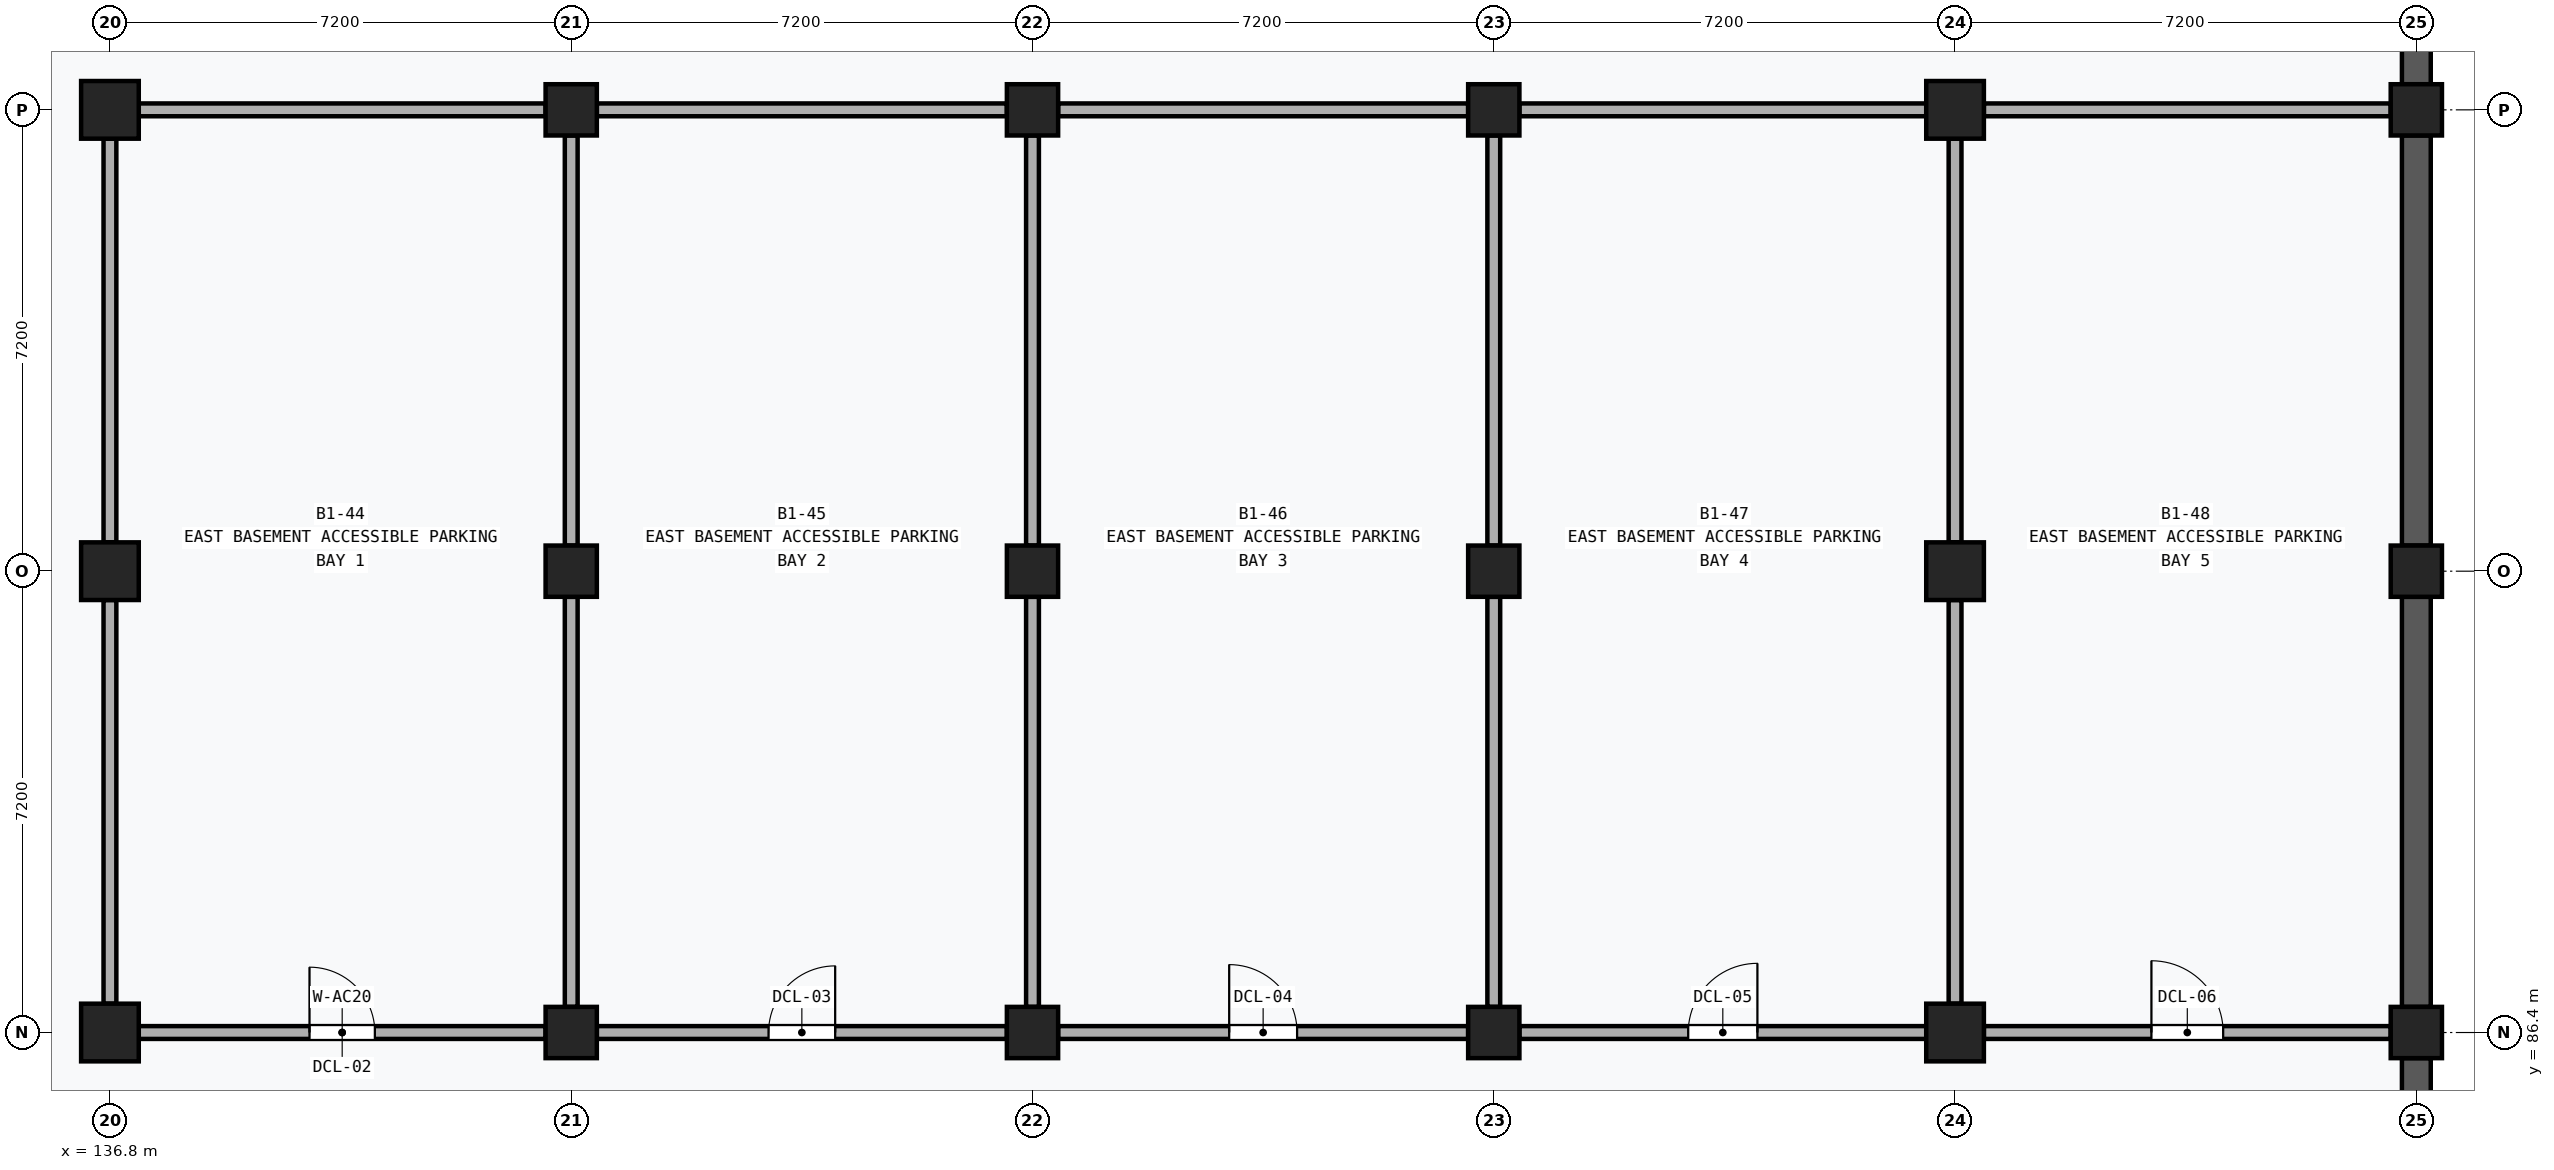
"""IFC4 building model, lengths in metres.
Left out: names, types, materials, properties, quantities, classifications, styles, units other than length and angle.
Written with IfcOpenShell. Run it as: python <this file> out.ifc"""

import sys

from ifc_helpers import new_model, si_unit, direction, frame, frame_2d, origin, origin_2d, place, context, subcontext, project, spatial, rectangle, extrude, element, fill, save


model = new_model("IFC4")
c1 = context("Model", 3, precision=1e-05, world=origin(), true_north=direction((0.0, 1.0)))
c2 = subcontext(c1, "Body", "Model", "MODEL_VIEW")
j1 = project(units=[si_unit("LENGTHUNIT", "METRE"), si_unit("PLANEANGLEUNIT", "RADIAN")], contexts=[c1])
p1 = place(None, origin())
s1 = spatial("IfcSite", under=j1, at=p1, CompositionType="ELEMENT")
p2 = place(p1, origin())
s2 = spatial("IfcBuilding", under=s1, at=p2, CompositionType="ELEMENT")
p3 = place(p2, frame((0.0, 0.0, -4.5)))
s3 = spatial("IfcBuildingStorey", under=s2, at=p3, CompositionType="ELEMENT", Elevation=-4.5)
for number, where, z_axis, x_axis in (
    (1, (136.8, 86.4, 0.0), (0.0, 0.0, 1.0), (1.0, 0.0, 0.0)),
    (2, (136.8, 93.6, 0.0), (0.0, 0.0, 1.0), (1.0, 0.0, 0.0)),
    (3, (136.8, 100.8, 0.0), (0.0, 0.0, 1.0), (1.0, 0.0, 0.0)),
):
    element("IfcColumn", number, at=place(p3, frame(where, z_axis=z_axis, x_axis=x_axis)), inside=s3, PredefinedType="COLUMN", context=c2, shape_type="SweptSolid", body=[
        extrude(rectangle(XDim=0.9, YDim=0.9, at=origin_2d()), origin(), (0.0, 0.0, 1.0), 4.5),
    ])
for number, where, z_axis, x_axis in (
    (4, (144.0, 86.4, 0.0), (0.0, 0.0, 1.0), (1.0, 0.0, 0.0)),
    (5, (144.0, 93.6, 0.0), (0.0, 0.0, 1.0), (1.0, 0.0, 0.0)),
    (6, (144.0, 100.8, 0.0), (0.0, 0.0, 1.0), (1.0, 0.0, 0.0)),
    (7, (151.2, 86.4, 0.0), (0.0, 0.0, 1.0), (1.0, 0.0, 0.0)),
    (8, (151.2, 93.6, 0.0), (0.0, 0.0, 1.0), (1.0, 0.0, 0.0)),
    (9, (151.2, 100.8, 0.0), (0.0, 0.0, 1.0), (1.0, 0.0, 0.0)),
    (10, (158.4, 86.4, 0.0), (0.0, 0.0, 1.0), (1.0, 0.0, 0.0)),
    (11, (158.4, 93.6, 0.0), (0.0, 0.0, 1.0), (1.0, 0.0, 0.0)),
    (12, (158.4, 100.8, 0.0), (0.0, 0.0, 1.0), (1.0, 0.0, 0.0)),
):
    element("IfcColumn", number, at=place(p3, frame(where, z_axis=z_axis, x_axis=x_axis)), inside=s3, PredefinedType="COLUMN", context=c2, shape_type="SweptSolid", body=[
        extrude(rectangle(XDim=0.8, YDim=0.8, at=origin_2d()), origin(), (0.0, 0.0, 1.0), 4.5),
    ])
for number, where, z_axis, x_axis in (
    (13, (165.6, 86.4, 0.0), (0.0, 0.0, 1.0), (1.0, 0.0, 0.0)),
    (14, (165.6, 93.6, 0.0), (0.0, 0.0, 1.0), (1.0, 0.0, 0.0)),
    (15, (165.6, 100.8, 0.0), (0.0, 0.0, 1.0), (1.0, 0.0, 0.0)),
):
    element("IfcColumn", number, at=place(p3, frame(where, z_axis=z_axis, x_axis=x_axis)), inside=s3, PredefinedType="COLUMN", context=c2, shape_type="SweptSolid", body=[
        extrude(rectangle(XDim=0.9, YDim=0.9, at=origin_2d()), origin(), (0.0, 0.0, 1.0), 4.5),
    ])
for number, where, z_axis, x_axis in (
    (16, (172.8, 86.4, 0.0), (0.0, 0.0, 1.0), (1.0, 0.0, 0.0)),
    (17, (172.8, 93.6, 0.0), (0.0, 0.0, 1.0), (1.0, 0.0, 0.0)),
    (18, (172.8, 100.8, 0.0), (0.0, 0.0, 1.0), (1.0, 0.0, 0.0)),
):
    element("IfcColumn", number, at=place(p3, frame(where, z_axis=z_axis, x_axis=x_axis)), inside=s3, PredefinedType="COLUMN", context=c2, shape_type="SweptSolid", body=[
        extrude(rectangle(XDim=0.8, YDim=0.8, at=origin_2d()), origin(), (0.0, 0.0, 1.0), 4.5),
    ])
for number, where, z_axis, x_axis in (
    (19, (172.8, 79.6, 0.0), (0.0, 0.0, 1.0), (0.0, 1.0, 0.0)),
    (20, (172.8, 86.8, 0.0), (0.0, 0.0, 1.0), (0.0, 1.0, 0.0)),
    (21, (172.8, 94.0, 0.0), (0.0, 0.0, 1.0), (0.0, 1.0, 0.0)),
):
    element("IfcWall", number, at=place(p3, frame(where, z_axis=z_axis, x_axis=x_axis)), inside=s3, PredefinedType="SOLIDWALL", context=c2, shape_type="SweptSolid", body=[
        extrude(rectangle(XDim=6.4, YDim=0.45, at=frame_2d((3.2, 0.0))), origin(), (0.0, 0.0, 1.0), 3.57),
    ])
p4 = place(p3, frame((172.8, 101.2, 0.0), z_axis=(0.0, 0.0, 1.0), x_axis=(0.0, 1.0, 0.0)))
e22 = element("IfcWall", 22, at=p4, inside=s3, PredefinedType="SOLIDWALL", context=c2, shape_type="SweptSolid", body=[
    extrude(rectangle(XDim=6.4, YDim=0.45, at=frame_2d((3.2, 0.0))), origin(), (0.0, 0.0, 1.0), 3.57),
])
p5 = place(p3, frame((137.25, 86.4, 0.0), z_axis=(0.0, 0.0, 1.0), x_axis=(1.0, 0.0, 0.0)))
e23 = element("IfcWall", 23, at=p5, inside=s3, PredefinedType="PARTITIONING", context=c2, shape_type="SweptSolid", body=[
    extrude(rectangle(XDim=6.35, YDim=0.2, at=frame_2d((3.175, 0.0))), origin(), (0.0, 0.0, 1.0), 3.3),
])
p6 = place(p5, frame((2.665, 0.0, 0.0)))
e24 = element("IfcOpeningElement", 24, at=p6, cuts=e23, PredefinedType="OPENING", context=c2, shape_type="SweptSolid", body=[
    extrude(rectangle(XDim=1.02, YDim=2.12, at=frame_2d((0.51, 1.06))), frame((0.0, 0.112, 0.0), z_axis=(0.0, -1.0, 0.0), x_axis=(1.0, 0.0, 0.0)), (0.0, 0.0, 1.0), 0.224),
])
p7 = place(p3, frame((136.8, 86.85, 0.0), z_axis=(0.0, 0.0, 1.0), x_axis=(0.0, 1.0, 0.0)))
e25 = element("IfcWall", 25, at=p7, inside=s3, PredefinedType="PARTITIONING", context=c2, shape_type="SweptSolid", body=[
    extrude(rectangle(XDim=6.3, YDim=0.2, at=frame_2d((3.15, 0.0))), origin(), (0.0, 0.0, 1.0), 3.3),
])
p8 = place(p3, frame((144.0, 86.8, 0.0), z_axis=(0.0, 0.0, 1.0), x_axis=(0.0, 1.0, 0.0)))
e26 = element("IfcWall", 26, at=p8, inside=s3, PredefinedType="PARTITIONING", context=c2, shape_type="SweptSolid", body=[
    extrude(rectangle(XDim=6.4, YDim=0.2, at=frame_2d((3.2, 0.0))), origin(), (0.0, 0.0, 1.0), 3.3),
])
p9 = place(p3, frame((137.25, 100.8, 0.0), z_axis=(0.0, 0.0, 1.0), x_axis=(1.0, 0.0, 0.0)))
e27 = element("IfcWall", 27, at=p9, inside=s3, PredefinedType="PARTITIONING", context=c2, shape_type="SweptSolid", body=[
    extrude(rectangle(XDim=6.35, YDim=0.2, at=frame_2d((3.175, 0.0))), origin(), (0.0, 0.0, 1.0), 3.3),
])
p10 = place(p3, frame((136.8, 94.05, 0.0), z_axis=(0.0, 0.0, 1.0), x_axis=(0.0, 1.0, 0.0)))
e28 = element("IfcWall", 28, at=p10, inside=s3, PredefinedType="PARTITIONING", context=c2, shape_type="SweptSolid", body=[
    extrude(rectangle(XDim=6.3, YDim=0.2, at=frame_2d((3.15, 0.0))), origin(), (0.0, 0.0, 1.0), 3.3),
])
p11 = place(p3, frame((144.0, 94.0, 0.0), z_axis=(0.0, 0.0, 1.0), x_axis=(0.0, 1.0, 0.0)))
e29 = element("IfcWall", 29, at=p11, inside=s3, PredefinedType="PARTITIONING", context=c2, shape_type="SweptSolid", body=[
    extrude(rectangle(XDim=6.4, YDim=0.2, at=frame_2d((3.2, 0.0))), origin(), (0.0, 0.0, 1.0), 3.3),
])
p12 = place(p3, frame((144.4, 86.4, 0.0), z_axis=(0.0, 0.0, 1.0), x_axis=(1.0, 0.0, 0.0)))
e30 = element("IfcWall", 30, at=p12, inside=s3, PredefinedType="PARTITIONING", context=c2, shape_type="SweptSolid", body=[
    extrude(rectangle(XDim=6.4, YDim=0.2, at=frame_2d((3.2, 0.0))), origin(), (0.0, 0.0, 1.0), 3.3),
])
p13 = place(p12, frame((2.68, 0.0, 0.0)))
e31 = element("IfcOpeningElement", 31, at=p13, cuts=e30, PredefinedType="OPENING", context=c2, shape_type="SweptSolid", body=[
    extrude(rectangle(XDim=1.04, YDim=2.14, at=frame_2d((0.52, 1.07))), frame((0.0, 0.112, 0.0), z_axis=(0.0, -1.0, 0.0), x_axis=(1.0, 0.0, 0.0)), (0.0, 0.0, 1.0), 0.224),
])
p14 = place(p3, frame((151.2, 86.8, 0.0), z_axis=(0.0, 0.0, 1.0), x_axis=(0.0, 1.0, 0.0)))
e32 = element("IfcWall", 32, at=p14, inside=s3, PredefinedType="PARTITIONING", context=c2, shape_type="SweptSolid", body=[
    extrude(rectangle(XDim=6.4, YDim=0.2, at=frame_2d((3.2, 0.0))), origin(), (0.0, 0.0, 1.0), 3.3),
])
p15 = place(p3, frame((144.4, 100.8, 0.0), z_axis=(0.0, 0.0, 1.0), x_axis=(1.0, 0.0, 0.0)))
e33 = element("IfcWall", 33, at=p15, inside=s3, PredefinedType="PARTITIONING", context=c2, shape_type="SweptSolid", body=[
    extrude(rectangle(XDim=6.4, YDim=0.2, at=frame_2d((3.2, 0.0))), origin(), (0.0, 0.0, 1.0), 3.3),
])
p16 = place(p3, frame((151.2, 94.0, 0.0), z_axis=(0.0, 0.0, 1.0), x_axis=(0.0, 1.0, 0.0)))
e34 = element("IfcWall", 34, at=p16, inside=s3, PredefinedType="PARTITIONING", context=c2, shape_type="SweptSolid", body=[
    extrude(rectangle(XDim=6.4, YDim=0.2, at=frame_2d((3.2, 0.0))), origin(), (0.0, 0.0, 1.0), 3.3),
])
p17 = place(p3, frame((151.6, 86.4, 0.0), z_axis=(0.0, 0.0, 1.0), x_axis=(1.0, 0.0, 0.0)))
e35 = element("IfcWall", 35, at=p17, inside=s3, PredefinedType="PARTITIONING", context=c2, shape_type="SweptSolid", body=[
    extrude(rectangle(XDim=6.4, YDim=0.2, at=frame_2d((3.2, 0.0))), origin(), (0.0, 0.0, 1.0), 3.3),
])
p18 = place(p17, frame((2.67, 0.0, 0.0)))
e36 = element("IfcOpeningElement", 36, at=p18, cuts=e35, PredefinedType="OPENING", context=c2, shape_type="SweptSolid", body=[
    extrude(rectangle(XDim=1.06, YDim=2.16, at=frame_2d((0.53, 1.08))), frame((0.0, 0.112, 0.0), z_axis=(0.0, -1.0, 0.0), x_axis=(1.0, 0.0, 0.0)), (0.0, 0.0, 1.0), 0.224),
])
for number, where, z_axis, x_axis in (
    (37, (158.4, 86.8, 0.0), (0.0, 0.0, 1.0), (0.0, 1.0, 0.0)),
    (38, (151.6, 100.8, 0.0), (0.0, 0.0, 1.0), (1.0, 0.0, 0.0)),
    (39, (158.4, 94.0, 0.0), (0.0, 0.0, 1.0), (0.0, 1.0, 0.0)),
):
    element("IfcWall", number, at=place(p3, frame(where, z_axis=z_axis, x_axis=x_axis)), inside=s3, PredefinedType="PARTITIONING", context=c2, shape_type="SweptSolid", body=[
        extrude(rectangle(XDim=6.4, YDim=0.2, at=frame_2d((3.2, 0.0))), origin(), (0.0, 0.0, 1.0), 3.3),
    ])
p19 = place(p3, frame((158.8, 86.4, 0.0), z_axis=(0.0, 0.0, 1.0), x_axis=(1.0, 0.0, 0.0)))
e40 = element("IfcWall", 40, at=p19, inside=s3, PredefinedType="PARTITIONING", context=c2, shape_type="SweptSolid", body=[
    extrude(rectangle(XDim=6.35, YDim=0.2, at=frame_2d((3.175, 0.0))), origin(), (0.0, 0.0, 1.0), 3.3),
])
p20 = place(p19, frame((2.635, 0.0, 0.0)))
e41 = element("IfcOpeningElement", 41, at=p20, cuts=e40, PredefinedType="OPENING", context=c2, shape_type="SweptSolid", body=[
    extrude(rectangle(XDim=1.08, YDim=2.18, at=frame_2d((0.54, 1.09))), frame((0.0, 0.112, 0.0), z_axis=(0.0, -1.0, 0.0), x_axis=(1.0, 0.0, 0.0)), (0.0, 0.0, 1.0), 0.224),
])
p21 = place(p3, frame((165.6, 86.85, 0.0), z_axis=(0.0, 0.0, 1.0), x_axis=(0.0, 1.0, 0.0)))
e42 = element("IfcWall", 42, at=p21, inside=s3, PredefinedType="PARTITIONING", context=c2, shape_type="SweptSolid", body=[
    extrude(rectangle(XDim=6.3, YDim=0.2, at=frame_2d((3.15, 0.0))), origin(), (0.0, 0.0, 1.0), 3.3),
])
p22 = place(p3, frame((158.8, 100.8, 0.0), z_axis=(0.0, 0.0, 1.0), x_axis=(1.0, 0.0, 0.0)))
e43 = element("IfcWall", 43, at=p22, inside=s3, PredefinedType="PARTITIONING", context=c2, shape_type="SweptSolid", body=[
    extrude(rectangle(XDim=6.35, YDim=0.2, at=frame_2d((3.175, 0.0))), origin(), (0.0, 0.0, 1.0), 3.3),
])
p23 = place(p3, frame((165.6, 94.05, 0.0), z_axis=(0.0, 0.0, 1.0), x_axis=(0.0, 1.0, 0.0)))
e44 = element("IfcWall", 44, at=p23, inside=s3, PredefinedType="PARTITIONING", context=c2, shape_type="SweptSolid", body=[
    extrude(rectangle(XDim=6.3, YDim=0.2, at=frame_2d((3.15, 0.0))), origin(), (0.0, 0.0, 1.0), 3.3),
])
p24 = place(p3, frame((166.05, 86.4, 0.0), z_axis=(0.0, 0.0, 1.0), x_axis=(1.0, 0.0, 0.0)))
e45 = element("IfcWall", 45, at=p24, inside=s3, PredefinedType="PARTITIONING", context=c2, shape_type="SweptSolid", body=[
    extrude(rectangle(XDim=6.35, YDim=0.2, at=frame_2d((3.175, 0.0))), origin(), (0.0, 0.0, 1.0), 3.3),
])
p25 = place(p24, frame((2.615, 0.0, 0.0)))
e46 = element("IfcOpeningElement", 46, at=p25, cuts=e45, PredefinedType="OPENING", context=c2, shape_type="SweptSolid", body=[
    extrude(rectangle(XDim=1.12, YDim=2.2, at=frame_2d((0.56, 1.1))), frame((0.0, 0.112, 0.0), z_axis=(0.0, -1.0, 0.0), x_axis=(1.0, 0.0, 0.0)), (0.0, 0.0, 1.0), 0.224),
])
p26 = place(p3, frame((166.05, 100.8, 0.0), z_axis=(0.0, 0.0, 1.0), x_axis=(1.0, 0.0, 0.0)))
e47 = element("IfcWall", 47, at=p26, inside=s3, PredefinedType="PARTITIONING", context=c2, shape_type="SweptSolid", body=[
    extrude(rectangle(XDim=6.35, YDim=0.2, at=frame_2d((3.175, 0.0))), origin(), (0.0, 0.0, 1.0), 3.3),
])
p27 = place(p6, origin())
e48 = element("IfcDoor", 48, at=p27, inside=s3, OperationType="SINGLE_SWING_LEFT", PredefinedType="DOOR", context=c2, shape_type="SweptSolid", body=[
    extrude(rectangle(XDim=1.02, YDim=2.12, at=frame_2d((0.51, 1.06))), frame((0.0, 0.025, 0.0), z_axis=(0.0, -1.0, 0.0), x_axis=(1.0, 0.0, 0.0)), (0.0, 0.0, 1.0), 0.05),
])
fill(e24, e48)
p28 = place(p13, origin())
e49 = element("IfcDoor", 49, at=p28, inside=s3, OperationType="SINGLE_SWING_RIGHT", PredefinedType="DOOR", context=c2, shape_type="SweptSolid", body=[
    extrude(rectangle(XDim=1.04, YDim=2.14, at=frame_2d((0.52, 1.07))), frame((0.0, 0.025, 0.0), z_axis=(0.0, -1.0, 0.0), x_axis=(1.0, 0.0, 0.0)), (0.0, 0.0, 1.0), 0.05),
])
fill(e31, e49)
p29 = place(p18, origin())
e50 = element("IfcDoor", 50, at=p29, inside=s3, OperationType="SINGLE_SWING_LEFT", PredefinedType="DOOR", context=c2, shape_type="SweptSolid", body=[
    extrude(rectangle(XDim=1.06, YDim=2.16, at=frame_2d((0.53, 1.08))), frame((0.0, 0.025, 0.0), z_axis=(0.0, -1.0, 0.0), x_axis=(1.0, 0.0, 0.0)), (0.0, 0.0, 1.0), 0.05),
])
fill(e36, e50)
p30 = place(p20, origin())
e51 = element("IfcDoor", 51, at=p30, inside=s3, OperationType="SINGLE_SWING_RIGHT", PredefinedType="DOOR", context=c2, shape_type="SweptSolid", body=[
    extrude(rectangle(XDim=1.08, YDim=2.18, at=frame_2d((0.54, 1.09))), frame((0.0, 0.025, 0.0), z_axis=(0.0, -1.0, 0.0), x_axis=(1.0, 0.0, 0.0)), (0.0, 0.0, 1.0), 0.05),
])
fill(e41, e51)
p31 = place(p25, origin())
e52 = element("IfcDoor", 52, at=p31, inside=s3, OperationType="SINGLE_SWING_LEFT", PredefinedType="DOOR", context=c2, shape_type="SweptSolid", body=[
    extrude(rectangle(XDim=1.12, YDim=2.2, at=frame_2d((0.56, 1.1))), frame((0.0, 0.025, 0.0), z_axis=(0.0, -1.0, 0.0), x_axis=(1.0, 0.0, 0.0)), (0.0, 0.0, 1.0), 0.05),
])
fill(e46, e52)
save(model, sys.argv[1])
